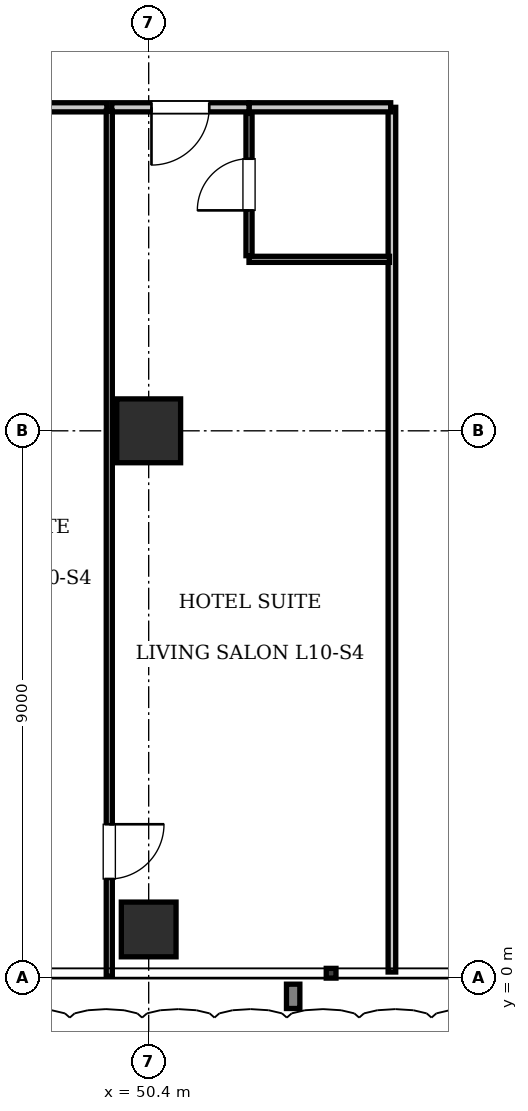
"""IFC4 building model, lengths in metres.
Left out: names, types, materials, properties, quantities, classifications, styles, units other than length and angle.
Written with IfcOpenShell. Run it as: python <this file> out.ifc"""

import sys

from ifc_helpers import new_model, si_unit, direction, frame, frame_2d, origin, origin_2d, place, context, subcontext, project, spatial, rectangle, extrude, element, fill, save


model = new_model("IFC4")
c1 = context("Model", 3, precision=1e-05, world=origin(), true_north=direction((0.0, 1.0)))
c2 = subcontext(c1, "Body", "Model", "MODEL_VIEW")
j1 = project(units=[si_unit("LENGTHUNIT", "METRE"), si_unit("PLANEANGLEUNIT", "RADIAN")], contexts=[c1])
p1 = place(None, origin())
s1 = spatial("IfcSite", under=j1, at=p1, CompositionType="ELEMENT")
p2 = place(p1, origin())
s2 = spatial("IfcBuilding", under=s1, at=p2, CompositionType="ELEMENT")
p3 = place(p2, frame((0.0, 0.0, 46.2)))
s3 = spatial("IfcBuildingStorey", under=s2, at=p3, CompositionType="ELEMENT", Elevation=46.2)
p4 = place(p3, frame((50.4, 9.0, 0.0), z_axis=(0.0, 0.0, 1.0), x_axis=(1.0, 0.0, 0.0)))
e1 = element("IfcColumn", 1, at=p4, inside=s3, PredefinedType="COLUMN", context=c2, shape_type="SweptSolid", body=[
    extrude(rectangle(XDim=1.05, YDim=1.05, at=origin_2d()), origin(), (0.0, 0.0, 1.0), 3.85),
])
p5 = place(p3, frame((50.4, 0.8, 0.0), z_axis=(0.0, 0.0, 1.0), x_axis=(1.0, 0.0, 0.0)))
e2 = element("IfcColumn", 2, at=p5, inside=s3, PredefinedType="COLUMN", context=c2, shape_type="SweptSolid", body=[
    extrude(rectangle(XDim=0.9, YDim=0.9, at=origin_2d()), origin(), (0.0, 0.0, 1.0), 3.85),
])
p6 = place(p3, frame((54.4, 0.1, 0.0), z_axis=(0.0, 0.0, 1.0), x_axis=(0.0, 1.0, 0.0)))
e3 = element("IfcWall", 3, at=p6, inside=s3, PredefinedType="PARTITIONING", context=c2, shape_type="SweptSolid", body=[
    extrude(rectangle(XDim=14.22, YDim=0.125, at=frame_2d((7.11, 0.0))), origin(), (0.0, 0.0, 1.0), 3.61),
])
p7 = place(p3, frame((52.05, 14.32, 0.0), z_axis=(0.0, 0.0, 1.0), x_axis=(1.0, 0.0, 0.0)))
e4 = element("IfcWall", 4, at=p7, inside=s3, PredefinedType="PARTITIONING", context=c2, shape_type="SweptSolid", body=[
    extrude(rectangle(XDim=2.33, YDim=0.15, at=frame_2d((1.165, 0.0))), origin(), (0.0, 0.0, 1.0), 3.61),
])
p8 = place(p3, frame((52.05, 11.82, 0.0), z_axis=(0.0, 0.0, 1.0), x_axis=(1.0, 0.0, 0.0)))
e5 = element("IfcWall", 5, at=p8, inside=s3, PredefinedType="PARTITIONING", context=c2, shape_type="SweptSolid", body=[
    extrude(rectangle(XDim=2.31, YDim=0.1, at=frame_2d((1.155, 0.0))), origin(), (0.0, 0.0, 1.0), 3.61),
])
p9 = place(p3, frame((52.05, 11.88, 0.0), z_axis=(0.0, 0.0, 1.0), x_axis=(0.0, 1.0, 0.0)))
e6 = element("IfcWall", 6, at=p9, inside=s3, PredefinedType="PARTITIONING", context=c2, shape_type="SweptSolid", body=[
    extrude(rectangle(XDim=2.34, YDim=0.1, at=frame_2d((1.17, 0.0))), origin(), (0.0, 0.0, 1.0), 3.61),
])
p10 = place(p9, frame((0.745, 0.0, 0.0)))
e7 = element("IfcOpeningElement", 7, at=p10, cuts=e6, PredefinedType="OPENING", context=c2, shape_type="SweptSolid", body=[
    extrude(rectangle(XDim=0.85, YDim=2.1, at=frame_2d((0.425, 1.05))), frame((0.0, 0.06, 0.0), z_axis=(0.0, -1.0, 0.0), x_axis=(1.0, 0.0, 0.0)), (0.0, 0.0, 1.0), 0.12),
])
p11 = place(p3, frame((46.12, 14.32, 0.0), z_axis=(0.0, 0.0, 1.0), x_axis=(1.0, 0.0, 0.0)))
e8 = element("IfcWall", 8, at=p11, inside=s3, PredefinedType="PARTITIONING", context=c2, shape_type="SweptSolid", body=[
    extrude(rectangle(XDim=3.592, YDim=0.15, at=frame_2d((1.796, 0.0))), origin(), (0.0, 0.0, 1.0), 3.61),
])
p12 = place(p3, frame((49.792, 14.32, 0.0), z_axis=(0.0, 0.0, 1.0), x_axis=(1.0, 0.0, 0.0)))
e9 = element("IfcWall", 9, at=p12, inside=s3, PredefinedType="PARTITIONING", context=c2, shape_type="SweptSolid", body=[
    extrude(rectangle(XDim=2.258, YDim=0.15, at=frame_2d((1.129, 0.0))), origin(), (0.0, 0.0, 1.0), 3.61),
])
p13 = place(p12, frame((0.654, 0.0, 0.0)))
e10 = element("IfcOpeningElement", 10, at=p13, cuts=e9, PredefinedType="OPENING", context=c2, shape_type="SweptSolid", body=[
    extrude(rectangle(XDim=0.95, YDim=2.15, at=frame_2d((0.475, 1.075))), frame((0.0, 0.085, 0.0), z_axis=(0.0, -1.0, 0.0), x_axis=(1.0, 0.0, 0.0)), (0.0, 0.0, 1.0), 0.17),
])
p14 = place(p3, frame((49.752, 0.03, 0.0), z_axis=(0.0, 0.0, 1.0), x_axis=(0.0, 1.0, 0.0)))
e11 = element("IfcWall", 11, at=p14, inside=s3, PredefinedType="PARTITIONING", context=c2, shape_type="SweptSolid", body=[
    extrude(rectangle(XDim=14.23, YDim=0.1, at=frame_2d((7.115, 0.0))), origin(), (0.0, 0.0, 1.0), 3.61),
])
p15 = place(p14, frame((1.6, 0.0, 0.0)))
e12 = element("IfcOpeningElement", 12, at=p15, cuts=e11, PredefinedType="OPENING", context=c2, shape_type="SweptSolid", body=[
    extrude(rectangle(XDim=0.9, YDim=2.1, at=frame_2d((0.45, 1.05))), frame((0.0, 0.06, 0.0), z_axis=(0.0, -1.0, 0.0), x_axis=(1.0, 0.0, 0.0)), (0.0, 0.0, 1.0), 0.12),
])
p16 = place(p10, origin())
e13 = element("IfcDoor", 13, at=p16, inside=s3, OperationType="SINGLE_SWING_LEFT", PredefinedType="DOOR", context=c2, shape_type="SweptSolid", body=[
    extrude(rectangle(XDim=0.85, YDim=2.1, at=frame_2d((0.425, 1.05))), frame((0.0, 0.025, 0.0), z_axis=(0.0, -1.0, 0.0), x_axis=(1.0, 0.0, 0.0)), (0.0, 0.0, 1.0), 0.05),
])
fill(e7, e13)
p17 = place(p13, frame((0.95, 0.0, 0.0), z_axis=(0.0, 0.0, 1.0), x_axis=(-1.0, 0.0, 0.0)))
e14 = element("IfcDoor", 14, at=p17, inside=s3, OperationType="SINGLE_SWING_RIGHT", PredefinedType="DOOR", context=c2, shape_type="SweptSolid", body=[
    extrude(rectangle(XDim=0.95, YDim=2.15, at=frame_2d((0.475, 1.075))), frame((0.0, 0.025, 0.0), z_axis=(0.0, -1.0, 0.0), x_axis=(1.0, 0.0, 0.0)), (0.0, 0.0, 1.0), 0.05),
])
fill(e10, e14)
p18 = place(p15, frame((0.9, 0.0, 0.0), z_axis=(0.0, 0.0, 1.0), x_axis=(-1.0, 0.0, 0.0)))
e15 = element("IfcDoor", 15, at=p18, inside=s3, OperationType="SINGLE_SWING_LEFT", PredefinedType="DOOR", context=c2, shape_type="SweptSolid", body=[
    extrude(rectangle(XDim=0.9, YDim=2.1, at=frame_2d((0.45, 1.05))), frame((0.0, 0.025, 0.0), z_axis=(0.0, -1.0, 0.0), x_axis=(1.0, 0.0, 0.0)), (0.0, 0.0, 1.0), 0.05),
])
fill(e12, e15)
save(model, sys.argv[1])
